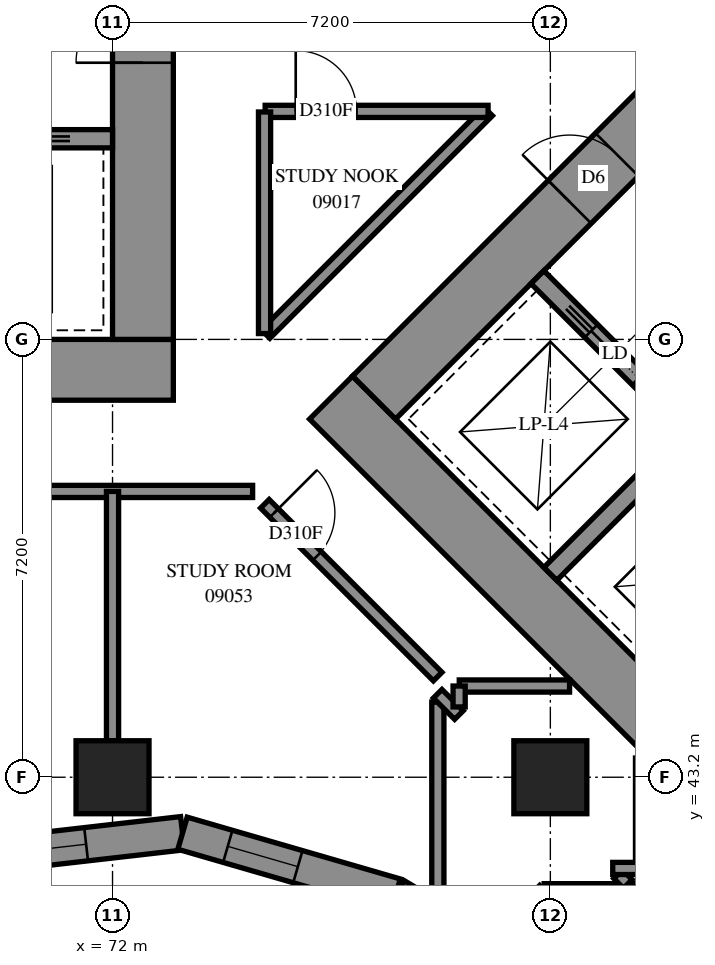
"""IFC4 building model, lengths in metres.
Left out: names, types, materials, properties, quantities, classifications, styles, units other than length and angle.
Written with IfcOpenShell. Run it as: python <this file> out.ifc"""

import sys

from ifc_helpers import new_model, si_unit, direction, frame, frame_2d, origin, origin_2d, place, context, subcontext, project, spatial, polyline, rectangle, outline, extrude, element, fill, save


model = new_model("IFC4")
c1 = context("Model", 3, precision=1e-05, world=origin(), true_north=direction((0.0, 1.0)))
c2 = subcontext(c1, "Body", "Model", "MODEL_VIEW")
j1 = project(units=[si_unit("LENGTHUNIT", "METRE"), si_unit("PLANEANGLEUNIT", "RADIAN")], contexts=[c1])
p1 = place(None, origin())
s1 = spatial("IfcSite", under=j1, at=p1, CompositionType="ELEMENT")
p2 = place(p1, origin())
s2 = spatial("IfcBuilding", under=s1, at=p2, CompositionType="ELEMENT")
p3 = place(p2, frame((0.0, 0.0, 37.2)))
s3 = spatial("IfcBuildingStorey", under=s2, at=p3, CompositionType="ELEMENT", Elevation=37.2)
for number, where, z_axis, x_axis in (
    (1, (72.0, 43.2, 0.0), (0.0, 0.0, 1.0), (1.0, 0.0, 0.0)),
    (2, (79.2, 43.2, 0.0), (0.0, 0.0, 1.0), (1.0, 0.0, 0.0)),
):
    element("IfcColumn", number, at=place(p3, frame(where, z_axis=z_axis, x_axis=x_axis)), inside=s3, PredefinedType="COLUMN", context=c2, shape_type="SweptSolid", body=[
        extrude(rectangle(XDim=1.2, YDim=1.2, at=origin_2d()), origin(), (0.0, 0.0, 1.0), 3.1),
    ])
p4 = place(p3, frame((56.6, 49.9, -0.3), z_axis=(0.0, 0.0, 1.0), x_axis=(1.0, 0.0, 0.0)))
e3 = element("IfcWall", 3, at=p4, inside=s3, PredefinedType="SHEAR", context=c2, shape_type="SweptSolid", body=[
    extrude(rectangle(XDim=16.4, YDim=1.0, at=frame_2d((8.2, 0.0))), origin(), (0.0, 0.0, 1.0), 2.7),
])
p5 = place(p3, frame((72.5, 50.4, -0.3), z_axis=(0.0, 0.0, 1.0), x_axis=(0.0, 1.0, 0.0)))
e4 = element("IfcWall", 4, at=p5, inside=s3, PredefinedType="SHEAR", context=c2, shape_type="SweptSolid", body=[
    extrude(rectangle(XDim=14.4, YDim=1.0, at=frame_2d((7.2, 0.0))), origin(), (0.0, 0.0, 1.0), 2.7),
])
p6 = place(p5, frame((4.55, 0.0, 0.3)))
e5 = element("IfcOpeningElement", 5, at=p6, cuts=e4, PredefinedType="OPENING", context=c2, shape_type="SweptSolid", body=[
    extrude(rectangle(XDim=1.1, YDim=2.1, at=frame_2d((0.55, 1.05))), frame((0.0, 0.51, 0.0), z_axis=(0.0, -1.0, 0.0), x_axis=(1.0, 0.0, 0.0)), (0.0, 0.0, 1.0), 1.02),
])
p7 = place(p5, frame((11.35, 0.0, 0.3)))
e6 = element("IfcOpeningElement", 6, at=p7, cuts=e4, PredefinedType="OPENING", context=c2, shape_type="SweptSolid", body=[
    extrude(rectangle(XDim=1.1, YDim=2.1, at=frame_2d((0.55, 1.05))), frame((0.0, 0.51, 0.0), z_axis=(0.0, -1.0, 0.0), x_axis=(1.0, 0.0, 0.0)), (0.0, 0.0, 1.0), 1.02),
])
p8 = place(p3, frame((57.6, 53.7, 0.0), z_axis=(0.0, 0.0, 1.0), x_axis=(1.0, 0.0, 0.0)))
e7 = element("IfcWall", 7, at=p8, inside=s3, PredefinedType="SOLIDWALL", context=c2, shape_type="SweptSolid", body=[
    extrude(rectangle(XDim=14.4, YDim=0.3, at=frame_2d((7.2, 0.0))), origin(), (0.0, 0.0, 1.0), 3.1),
])
p9 = place(p8, frame((1.25, 0.0, 0.0)))
e8 = element("IfcOpeningElement", 8, at=p9, cuts=e7, PredefinedType="OPENING", context=c2, shape_type="SweptSolid", body=[
    extrude(rectangle(XDim=1.1, YDim=2.1, at=frame_2d((0.55, 1.05))), frame((0.0, 0.16, 0.0), z_axis=(0.0, -1.0, 0.0), x_axis=(1.0, 0.0, 0.0)), (0.0, 0.0, 1.0), 0.32),
])
p10 = place(p8, frame((4.85, 0.0, 0.0)))
e9 = element("IfcOpeningElement", 9, at=p10, cuts=e7, PredefinedType="OPENING", context=c2, shape_type="SweptSolid", body=[
    extrude(rectangle(XDim=1.1, YDim=2.1, at=frame_2d((0.55, 1.05))), frame((0.0, 0.16, 0.0), z_axis=(0.0, -1.0, 0.0), x_axis=(1.0, 0.0, 0.0)), (0.0, 0.0, 1.0), 0.32),
])
p11 = place(p8, frame((8.45, 0.0, 0.0)))
e10 = element("IfcOpeningElement", 10, at=p11, cuts=e7, PredefinedType="OPENING", context=c2, shape_type="SweptSolid", body=[
    extrude(rectangle(XDim=1.1, YDim=2.1, at=frame_2d((0.55, 1.05))), frame((0.0, 0.16, 0.0), z_axis=(0.0, -1.0, 0.0), x_axis=(1.0, 0.0, 0.0)), (0.0, 0.0, 1.0), 0.32),
])
p12 = place(p8, frame((12.05, 0.0, 0.0)))
e11 = element("IfcOpeningElement", 11, at=p12, cuts=e7, PredefinedType="OPENING", context=c2, shape_type="SweptSolid", body=[
    extrude(rectangle(XDim=1.1, YDim=2.1, at=frame_2d((0.55, 1.05))), frame((0.0, 0.16, 0.0), z_axis=(0.0, -1.0, 0.0), x_axis=(1.0, 0.0, 0.0)), (0.0, 0.0, 1.0), 0.32),
])
p13 = place(p3, frame((75.594, 49.443, -0.3), z_axis=(0.0, 0.0, 1.0), x_axis=(0.7071037324, -0.70710983, 0.0)))
e12 = element("IfcWall", 12, at=p13, inside=s3, PredefinedType="SHEAR", context=c2, shape_type="SweptSolid", body=[
    extrude(rectangle(XDim=16.4, YDim=1.0, at=frame_2d((8.2, 0.0))), origin(), (0.0, 0.0, 1.0), 2.7),
])
p14 = place(p3, frame((76.301, 49.443, -0.3), z_axis=(0.0, 0.0, 1.0), x_axis=(0.7071067812, 0.7071067812, 0.0)))
e13 = element("IfcWall", 13, at=p14, inside=s3, PredefinedType="SHEAR", context=c2, shape_type="SweptSolid", body=[
    extrude(rectangle(XDim=14.4, YDim=1.0, at=frame_2d((7.2, 0.0))), origin(), (0.0, 0.0, 1.0), 2.7),
])
p15 = place(p14, frame((4.55, 0.0, 0.3)))
e14 = element("IfcOpeningElement", 14, at=p15, cuts=e13, PredefinedType="OPENING", context=c2, shape_type="SweptSolid", body=[
    extrude(rectangle(XDim=1.1, YDim=2.1, at=frame_2d((0.55, 1.05))), frame((0.0, 0.51, 0.0), z_axis=(0.0, -1.0, 0.0), x_axis=(1.0, 0.0, 0.0)), (0.0, 0.0, 1.0), 1.02),
])
p16 = place(p14, frame((11.35, 0.0, 0.3)))
e15 = element("IfcOpeningElement", 15, at=p16, cuts=e13, PredefinedType="OPENING", context=c2, shape_type="SweptSolid", body=[
    extrude(rectangle(XDim=1.1, YDim=2.1, at=frame_2d((0.55, 1.05))), frame((0.0, 0.51, 0.0), z_axis=(0.0, -1.0, 0.0), x_axis=(1.0, 0.0, 0.0)), (0.0, 0.0, 1.0), 1.02),
])
p17 = place(p3, frame((79.2, 46.544, 0.0), z_axis=(0.0, 0.0, 1.0), x_axis=(0.7071219326, 0.7070916295, 0.0)))
e16 = element("IfcWall", 16, at=p17, inside=s3, PredefinedType="SOLIDWALL", context=c2, shape_type="SweptSolid", body=[
    extrude(rectangle(XDim=3.3, YDim=0.3, at=frame_2d((1.65, 0.0))), origin(), (0.0, 0.0, 1.0), 3.1),
])
p18 = place(p3, frame((78.988, 51.423, 0.0), z_axis=(0.0, 0.0, 1.0), x_axis=(0.7071067812, -0.7071067812, 0.0)))
e17 = element("IfcWall", 17, at=p18, inside=s3, PredefinedType="SOLIDWALL", context=c2, shape_type="SweptSolid", body=[
    extrude(rectangle(XDim=14.4, YDim=0.3, at=frame_2d((7.2, 0.0))), origin(), (0.0, 0.0, 1.0), 3.1),
])
p19 = place(p18, frame((1.25, 0.0, 0.0)))
e18 = element("IfcOpeningElement", 18, at=p19, cuts=e17, PredefinedType="OPENING", context=c2, shape_type="SweptSolid", body=[
    extrude(rectangle(XDim=1.1, YDim=2.1, at=frame_2d((0.55, 1.05))), frame((0.0, 0.16, 0.0), z_axis=(0.0, -1.0, 0.0), x_axis=(1.0, 0.0, 0.0)), (0.0, 0.0, 1.0), 0.32),
])
p20 = place(p18, frame((4.85, 0.0, 0.0)))
e19 = element("IfcOpeningElement", 19, at=p20, cuts=e17, PredefinedType="OPENING", context=c2, shape_type="SweptSolid", body=[
    extrude(rectangle(XDim=1.1, YDim=2.1, at=frame_2d((0.55, 1.05))), frame((0.0, 0.16, 0.0), z_axis=(0.0, -1.0, 0.0), x_axis=(1.0, 0.0, 0.0)), (0.0, 0.0, 1.0), 0.32),
])
p21 = place(p18, frame((8.45, 0.0, 0.0)))
e20 = element("IfcOpeningElement", 20, at=p21, cuts=e17, PredefinedType="OPENING", context=c2, shape_type="SweptSolid", body=[
    extrude(rectangle(XDim=1.1, YDim=2.1, at=frame_2d((0.55, 1.05))), frame((0.0, 0.16, 0.0), z_axis=(0.0, -1.0, 0.0), x_axis=(1.0, 0.0, 0.0)), (0.0, 0.0, 1.0), 0.32),
])
p22 = place(p18, frame((12.05, 0.0, 0.0)))
e21 = element("IfcOpeningElement", 21, at=p22, cuts=e17, PredefinedType="OPENING", context=c2, shape_type="SweptSolid", body=[
    extrude(rectangle(XDim=1.1, YDim=2.1, at=frame_2d((0.55, 1.05))), frame((0.0, 0.16, 0.0), z_axis=(0.0, -1.0, 0.0), x_axis=(1.0, 0.0, 0.0)), (0.0, 0.0, 1.0), 0.32),
])
p23 = place(p3, frame((69.709, 41.886, 0.0), z_axis=(0.0, 0.0, 1.0), x_axis=(0.9935208506, 0.1136499866, 0.0)))
e22 = element("IfcWall", 22, at=p23, inside=s3, PredefinedType="SOLIDWALL", context=c2, shape_type="SweptSolid", body=[
    extrude(outline(polyline([(-0.032, -0.275), (3.409, -0.275), (3.519, 0.275), (0.032, 0.275), (-0.032, -0.275)])), origin(), (0.0, 0.0, 1.0), 3.1),
])
p24 = place(p23, frame((0.669, 0.0, 0.5)))
e23 = element("IfcOpeningElement", 23, at=p24, cuts=e22, PredefinedType="OPENING", context=c2, shape_type="SweptSolid", body=[
    extrude(rectangle(XDim=1.2, YDim=2.45, at=frame_2d((0.6, 1.225))), frame((0.0, 0.285, 0.0), z_axis=(0.0, -1.0, 0.0), x_axis=(1.0, 0.0, 0.0)), (0.0, 0.0, 1.0), 0.57),
])
p25 = place(p3, frame((73.151, 42.279, 0.0), z_axis=(0.0, 0.0, 1.0), x_axis=(0.9604505413, -0.2784506377, 0.0)))
e24 = element("IfcWall", 24, at=p25, inside=s3, PredefinedType="SOLIDWALL", context=c2, shape_type="SweptSolid", body=[
    extrude(outline(polyline([(0.055, -0.275), (3.614, -0.275), (3.684, 0.275), (-0.055, 0.275), (0.055, -0.275)])), origin(), (0.0, 0.0, 1.0), 3.1),
])
p26 = place(p25, frame((0.775, 0.0, 0.5)))
e25 = element("IfcOpeningElement", 25, at=p26, cuts=e24, PredefinedType="OPENING", context=c2, shape_type="SweptSolid", body=[
    extrude(rectangle(XDim=1.2, YDim=2.45, at=frame_2d((0.6, 1.225))), frame((0.0, 0.285, 0.0), z_axis=(0.0, -1.0, 0.0), x_axis=(1.0, 0.0, 0.0)), (0.0, 0.0, 1.0), 0.57),
])
p27 = place(p3, frame((76.656, 41.263, 0.0), z_axis=(0.0, 0.0, 1.0), x_axis=(0.8602155685, -0.5099305597, 0.0)))
e26 = element("IfcWall", 26, at=p27, inside=s3, PredefinedType="SOLIDWALL", context=c2, shape_type="SweptSolid", body=[
    extrude(outline(polyline([(0.035, -0.275), (4.036, -0.275), (4.133, 0.275), (-0.035, 0.275), (0.035, -0.275)])), origin(), (0.0, 0.0, 1.0), 3.1),
])
p28 = place(p27, frame((2.202, 0.0, 0.5)))
e27 = element("IfcOpeningElement", 27, at=p28, cuts=e26, PredefinedType="OPENING", context=c2, shape_type="SweptSolid", body=[
    extrude(rectangle(XDim=1.2, YDim=2.45, at=frame_2d((0.6, 1.225))), frame((0.0, 0.285, 0.0), z_axis=(0.0, -1.0, 0.0), x_axis=(1.0, 0.0, 0.0)), (0.0, 0.0, 1.0), 0.57),
])
p29 = place(p27, frame((0.848, 0.0, 0.45)))
e28 = element("IfcOpeningElement", 28, at=p29, cuts=e26, PredefinedType="OPENING", context=c2, shape_type="SweptSolid", body=[
    extrude(rectangle(XDim=0.8, YDim=2.5, at=frame_2d((0.4, 1.25))), frame((0.0, 0.285, 0.0), z_axis=(0.0, -1.0, 0.0), x_axis=(1.0, 0.0, 0.0)), (0.0, 0.0, 1.0), 0.57),
])
p30 = place(p3, frame((55.1, 47.9, 0.0), z_axis=(0.0, 0.0, 1.0), x_axis=(1.0, 0.0, 0.0)))
e29 = element("IfcWall", 29, at=p30, inside=s3, PredefinedType="PARTITIONING", context=c2, shape_type="SweptSolid", body=[
    extrude(rectangle(XDim=19.204, YDim=0.2, at=frame_2d((9.602, 0.0))), origin(), (0.0, 0.0, 1.0), 3.1),
])
p31 = place(p30, frame((6.399, 0.0, 0.0)))
e30 = element("IfcOpeningElement", 30, at=p31, cuts=e29, PredefinedType="OPENING", context=c2, shape_type="SweptSolid", body=[
    extrude(rectangle(XDim=0.9, YDim=2.1, at=frame_2d((0.45, 1.05))), frame((0.0, 0.11, 0.0), z_axis=(0.0, -1.0, 0.0), x_axis=(1.0, 0.0, 0.0)), (0.0, 0.0, 1.0), 0.22),
])
p32 = place(p30, frame((13.599, 0.0, 0.0)))
e31 = element("IfcOpeningElement", 31, at=p32, cuts=e29, PredefinedType="OPENING", context=c2, shape_type="SweptSolid", body=[
    extrude(rectangle(XDim=0.9, YDim=2.1, at=frame_2d((0.45, 1.05))), frame((0.0, 0.11, 0.0), z_axis=(0.0, -1.0, 0.0), x_axis=(1.0, 0.0, 0.0)), (0.0, 0.0, 1.0), 0.22),
])
p33 = place(p3, frame((74.517, 50.489, 0.0), z_axis=(0.0, 0.0, 1.0), x_axis=(0.7071067812, 0.7071067812, 0.0)))
e32 = element("IfcWall", 32, at=p33, inside=s3, PredefinedType="PARTITIONING", context=c2, shape_type="SweptSolid", body=[
    extrude(rectangle(XDim=5.176, YDim=0.2, at=frame_2d((2.588, 0.0))), origin(), (0.0, 0.0, 1.0), 3.1),
])
p34 = place(p3, frame((72.0, 43.8, 0.0), z_axis=(0.0, 0.0, 1.0), x_axis=(0.0, 1.0, 0.0)))
e33 = element("IfcWall", 33, at=p34, inside=s3, PredefinedType="PARTITIONING", context=c2, shape_type="SweptSolid", body=[
    extrude(rectangle(XDim=4.1, YDim=0.2, at=frame_2d((2.05, 0.0))), origin(), (0.0, 0.0, 1.0), 3.1),
])
p35 = place(p3, frame((74.505, 47.697, 0.0), z_axis=(0.0, 0.0, 1.0), x_axis=(0.7071067812, -0.7071067812, 0.0)))
e34 = element("IfcWall", 34, at=p35, inside=s3, PredefinedType="PARTITIONING", context=c2, shape_type="SweptSolid", body=[
    extrude(rectangle(XDim=4.019, YDim=0.2, at=frame_2d((2.01, 0.0))), origin(), (0.0, 0.0, 1.0), 3.1),
])
p36 = place(p35, frame((0.215, 0.0, 0.0)))
e35 = element("IfcOpeningElement", 35, at=p36, cuts=e34, PredefinedType="OPENING", context=c2, shape_type="SweptSolid", body=[
    extrude(rectangle(XDim=1.0, YDim=2.1, at=frame_2d((0.5, 1.05))), frame((0.0, 0.11, 0.0), z_axis=(0.0, -1.0, 0.0), x_axis=(1.0, 0.0, 0.0)), (0.0, 0.0, 1.0), 0.22),
])
p37 = place(p3, frame((74.51, 54.15, 0.0), z_axis=(0.0, 0.0, 1.0), x_axis=(1.0, 0.0, 0.0)))
e36 = element("IfcWall", 36, at=p37, inside=s3, PredefinedType="PARTITIONING", context=c2, shape_type="SweptSolid", body=[
    extrude(rectangle(XDim=3.666, YDim=0.2, at=frame_2d((1.833, 0.0))), origin(), (0.0, 0.0, 1.0), 3.1),
])
p38 = place(p37, frame((0.502, 0.0, 0.0)))
e37 = element("IfcOpeningElement", 37, at=p38, cuts=e36, PredefinedType="OPENING", context=c2, shape_type="SweptSolid", body=[
    extrude(rectangle(XDim=1.0, YDim=2.1, at=frame_2d((0.5, 1.05))), frame((0.0, 0.11, 0.0), z_axis=(0.0, -1.0, 0.0), x_axis=(1.0, 0.0, 0.0)), (0.0, 0.0, 1.0), 0.22),
])
p39 = place(p3, frame((74.5, 50.496, 0.0), z_axis=(0.0, 0.0, 1.0), x_axis=(0.0, 1.0, 0.0)))
e38 = element("IfcWall", 38, at=p39, inside=s3, PredefinedType="PARTITIONING", context=c2, shape_type="SweptSolid", body=[
    extrude(rectangle(XDim=3.644, YDim=0.2, at=frame_2d((1.822, 0.0))), origin(), (0.0, 0.0, 1.0), 3.1),
])
p40 = place(p3, frame((77.35, 41.171, 0.0), z_axis=(0.0, 0.0, 1.0), x_axis=(0.0, 1.0, 0.0)))
e39 = element("IfcWall", 39, at=p40, inside=s3, PredefinedType="PARTITIONING", context=c2, shape_type="SweptSolid", body=[
    extrude(rectangle(XDim=3.265, YDim=0.2, at=frame_2d((1.632, 0.0))), origin(), (0.0, 0.0, 1.0), 3.1),
])
for number, where, z_axis, x_axis in (
    (40, (77.702, 44.7, 0.0), (0.0, 0.0, 1.0), (1.0, 0.0, 0.0)),
    (41, (80.7, 41.702, 0.0), (0.0, 0.0, 1.0), (0.0, 1.0, 0.0)),
):
    element("IfcWall", number, at=place(p3, frame(where, z_axis=z_axis, x_axis=x_axis)), inside=s3, PredefinedType="PARTITIONING", context=c2, shape_type="SweptSolid", body=[
        extrude(rectangle(XDim=1.814, YDim=0.2, at=frame_2d((0.907, 0.0))), origin(), (0.0, 0.0, 1.0), 3.1),
    ])
p41 = place(p3, frame((79.098, 41.35, 0.0), z_axis=(0.0, 0.0, 1.0), x_axis=(1.0, 0.0, 0.0)))
e42 = element("IfcWall", 42, at=p41, inside=s3, PredefinedType="PARTITIONING", context=c2, shape_type="SweptSolid", body=[
    extrude(rectangle(XDim=1.478, YDim=0.2, at=frame_2d((0.739, 0.0))), origin(), (0.0, 0.0, 1.0), 3.1),
])
p42 = place(p3, frame((77.347, 44.573, 0.0), z_axis=(0.0, 0.0, 1.0), x_axis=(0.7071067812, -0.7071067812, 0.0)))
e43 = element("IfcWall", 43, at=p42, inside=s3, PredefinedType="PARTITIONING", context=c2, shape_type="SweptSolid", body=[
    extrude(rectangle(XDim=0.495, YDim=0.2, at=frame_2d((0.247, 0.0))), origin(), (0.0, 0.0, 1.0), 3.1),
])
p43 = place(p3, frame((80.315, 41.605, 0.0), z_axis=(0.0, 0.0, 1.0), x_axis=(0.7071067812, -0.7071067812, 0.0)))
e44 = element("IfcWall", 44, at=p43, inside=s3, PredefinedType="PARTITIONING", context=c2, shape_type="SweptSolid", body=[
    extrude(rectangle(XDim=0.225, YDim=0.2, at=frame_2d((0.113, 0.0))), origin(), (0.0, 0.0, 1.0), 3.1),
])
p44 = place(p3, frame((77.7, 44.356, 0.0), z_axis=(0.0, 0.0, 1.0), x_axis=(0.0, 1.0, 0.0)))
e45 = element("IfcWall", 45, at=p44, inside=s3, PredefinedType="PARTITIONING", context=c2, shape_type="SweptSolid", body=[
    extrude(rectangle(XDim=0.344, YDim=0.2, at=frame_2d((0.172, 0.0))), origin(), (0.0, 0.0, 1.0), 3.1),
])
p45 = place(p3, frame((80.226, 41.7, 0.0), z_axis=(0.0, 0.0, 1.0), x_axis=(1.0, 0.0, 0.0)))
e46 = element("IfcWall", 46, at=p45, inside=s3, PredefinedType="PARTITIONING", context=c2, shape_type="SweptSolid", body=[
    extrude(rectangle(XDim=0.474, YDim=0.2, at=frame_2d((0.237, 0.0))), origin(), (0.0, 0.0, 1.0), 3.1),
])
p46 = place(p24, origin())
e47 = element("IfcWindow", 47, at=p46, inside=s3, PartitioningType="SINGLE_PANEL", PredefinedType="WINDOW", context=c2, shape_type="SweptSolid", body=[
    extrude(rectangle(XDim=1.2, YDim=2.45, at=frame_2d((0.6, 1.225))), frame((0.0, 0.155, 0.0), z_axis=(0.0, -1.0, 0.0), x_axis=(1.0, 0.0, 0.0)), (0.0, 0.0, 1.0), 0.06),
])
fill(e23, e47)
p47 = place(p26, origin())
e48 = element("IfcWindow", 48, at=p47, inside=s3, PartitioningType="SINGLE_PANEL", PredefinedType="WINDOW", context=c2, shape_type="SweptSolid", body=[
    extrude(rectangle(XDim=1.2, YDim=2.45, at=frame_2d((0.6, 1.225))), frame((0.0, 0.155, 0.0), z_axis=(0.0, -1.0, 0.0), x_axis=(1.0, 0.0, 0.0)), (0.0, 0.0, 1.0), 0.06),
])
fill(e25, e48)
p48 = place(p6, origin())
e49 = element("IfcDoor", 49, at=p48, inside=s3, OperationType="DOUBLE_DOOR_SINGLE_SWING", PredefinedType="DOOR", context=c2, shape_type="SweptSolid", body=[
    extrude(rectangle(XDim=1.1, YDim=2.1, at=frame_2d((0.55, 1.05))), frame((0.0, 0.025, 0.0), z_axis=(0.0, -1.0, 0.0), x_axis=(1.0, 0.0, 0.0)), (0.0, 0.0, 1.0), 0.05),
])
fill(e5, e49)
p49 = place(p15, origin())
e50 = element("IfcDoor", 50, at=p49, inside=s3, OperationType="DOUBLE_DOOR_SINGLE_SWING", PredefinedType="DOOR", context=c2, shape_type="SweptSolid", body=[
    extrude(rectangle(XDim=1.1, YDim=2.1, at=frame_2d((0.55, 1.05))), frame((0.0, 0.025, 0.0), z_axis=(0.0, -1.0, 0.0), x_axis=(1.0, 0.0, 0.0)), (0.0, 0.0, 1.0), 0.05),
])
fill(e14, e50)
p50 = place(p19, origin())
e51 = element("IfcDoor", 51, at=p50, inside=s3, OperationType="SLIDING_TO_LEFT", PredefinedType="DOOR", context=c2, shape_type="SweptSolid", body=[
    extrude(rectangle(XDim=1.1, YDim=2.1, at=frame_2d((0.55, 1.05))), frame((0.0, 0.025, 0.0), z_axis=(0.0, -1.0, 0.0), x_axis=(1.0, 0.0, 0.0)), (0.0, 0.0, 1.0), 0.05),
])
fill(e18, e51)
p51 = place(p38, origin())
e52 = element("IfcDoor", 52, at=p51, inside=s3, OperationType="SINGLE_SWING_RIGHT", PredefinedType="DOOR", context=c2, shape_type="SweptSolid", body=[
    extrude(rectangle(XDim=1.0, YDim=2.1, at=frame_2d((0.5, 1.05))), frame((0.0, 0.025, 0.0), z_axis=(0.0, -1.0, 0.0), x_axis=(1.0, 0.0, 0.0)), (0.0, 0.0, 1.0), 0.05),
])
fill(e37, e52)
p52 = place(p36, origin())
e53 = element("IfcDoor", 53, at=p52, inside=s3, OperationType="SINGLE_SWING_LEFT", PredefinedType="DOOR", context=c2, shape_type="SweptSolid", body=[
    extrude(rectangle(XDim=1.0, YDim=2.1, at=frame_2d((0.5, 1.05))), frame((0.0, 0.025, 0.0), z_axis=(0.0, -1.0, 0.0), x_axis=(1.0, 0.0, 0.0)), (0.0, 0.0, 1.0), 0.05),
])
fill(e35, e53)
save(model, sys.argv[1])
